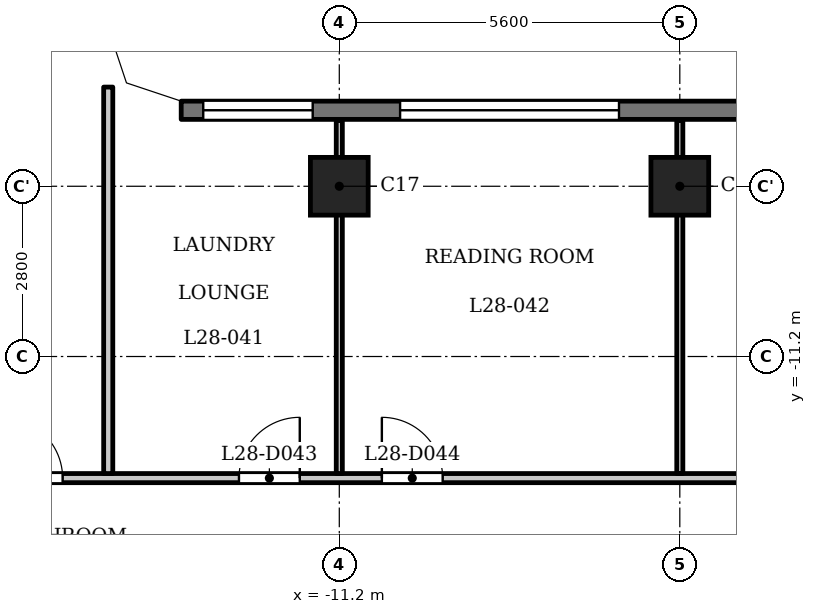
"""IFC4 building model, lengths in metres.
Left out: names, types, materials, properties, quantities, classifications, styles, units other than length and angle.
Written with IfcOpenShell. Run it as: python <this file> out.ifc"""

import sys

from ifc_helpers import new_model, si_unit, direction, frame, frame_2d, origin, origin_2d, place, context, subcontext, project, spatial, polyline, rectangle, outline, extrude, element, fill, save


model = new_model("IFC4")
c1 = context("Model", 3, precision=1e-05, world=origin(), true_north=direction((0.0, 1.0)))
c2 = subcontext(c1, "Body", "Model", "MODEL_VIEW")
j1 = project(units=[si_unit("LENGTHUNIT", "METRE"), si_unit("PLANEANGLEUNIT", "RADIAN")], contexts=[c1])
p1 = place(None, origin())
s1 = spatial("IfcSite", under=j1, at=p1, CompositionType="ELEMENT")
p2 = place(p1, origin())
s2 = spatial("IfcBuilding", under=s1, at=p2, CompositionType="ELEMENT")
p3 = place(p2, frame((0.0, 0.0, 111.3)))
s3 = spatial("IfcBuildingStorey", under=s2, at=p3, CompositionType="ELEMENT", Elevation=111.3)
for number, where, z_axis, x_axis in (
    (1, (-11.2, -8.4, 0.0), (0.0, 0.0, 1.0), (1.0, 0.0, 0.0)),
    (2, (-5.6, -8.4, 0.0), (0.0, 0.0, 1.0), (1.0, 0.0, 0.0)),
):
    element("IfcColumn", number, at=place(p3, frame(where, z_axis=z_axis, x_axis=x_axis)), inside=s3, PredefinedType="COLUMN", context=c2, shape_type="SweptSolid", body=[
        extrude(rectangle(XDim=0.95, YDim=0.95, at=origin_2d()), origin(), (0.0, 0.0, 1.0), 3.5),
    ])
p4 = place(p3, frame((13.8, -7.15, 0.0), z_axis=(0.0, 0.0, 1.0), x_axis=(-1.0, 0.0, 0.0)))
e3 = element("IfcWall", 3, at=p4, inside=s3, PredefinedType="SOLIDWALL", context=c2, shape_type="SweptSolid", body=[
    extrude(rectangle(XDim=27.6, YDim=0.3, at=frame_2d((13.8, 0.0))), origin(), (0.0, 0.0, 1.0), 3.2),
])
p5 = place(p4, frame((0.363, 0.0, 0.9)))
e4 = element("IfcOpeningElement", 4, at=p5, cuts=e3, PredefinedType="OPENING", context=c2, shape_type="SweptSolid", body=[
    extrude(rectangle(XDim=1.8, YDim=1.25, at=frame_2d((0.9, 0.625))), frame((0.0, 0.16, 0.0), z_axis=(0.0, -1.0, 0.0), x_axis=(1.0, 0.0, 0.0)), (0.0, 0.0, 1.0), 0.32),
])
p6 = place(p4, frame((3.6, 0.0, 1.2)))
e5 = element("IfcOpeningElement", 5, at=p6, cuts=e3, PredefinedType="OPENING", context=c2, shape_type="SweptSolid", body=[
    extrude(rectangle(XDim=3.6, YDim=0.95, at=frame_2d((1.8, 0.475))), frame((0.0, 0.16, 0.0), z_axis=(0.0, -1.0, 0.0), x_axis=(1.0, 0.0, 0.0)), (0.0, 0.0, 1.0), 0.32),
])
p7 = place(p4, frame((9.2, 0.0, 1.2)))
e6 = element("IfcOpeningElement", 6, at=p7, cuts=e3, PredefinedType="OPENING", context=c2, shape_type="SweptSolid", body=[
    extrude(rectangle(XDim=3.6, YDim=0.95, at=frame_2d((1.8, 0.475))), frame((0.0, 0.16, 0.0), z_axis=(0.0, -1.0, 0.0), x_axis=(1.0, 0.0, 0.0)), (0.0, 0.0, 1.0), 0.32),
])
p8 = place(p4, frame((14.8, 0.0, 1.2)))
e7 = element("IfcOpeningElement", 7, at=p8, cuts=e3, PredefinedType="OPENING", context=c2, shape_type="SweptSolid", body=[
    extrude(rectangle(XDim=3.6, YDim=0.95, at=frame_2d((1.8, 0.475))), frame((0.0, 0.16, 0.0), z_axis=(0.0, -1.0, 0.0), x_axis=(1.0, 0.0, 0.0)), (0.0, 0.0, 1.0), 0.32),
])
p9 = place(p4, frame((20.4, 0.0, 1.2)))
e8 = element("IfcOpeningElement", 8, at=p9, cuts=e3, PredefinedType="OPENING", context=c2, shape_type="SweptSolid", body=[
    extrude(rectangle(XDim=3.6, YDim=0.95, at=frame_2d((1.8, 0.475))), frame((0.0, 0.16, 0.0), z_axis=(0.0, -1.0, 0.0), x_axis=(1.0, 0.0, 0.0)), (0.0, 0.0, 1.0), 0.32),
])
p10 = place(p4, frame((25.438, 0.0, 0.9)))
e9 = element("IfcOpeningElement", 9, at=p10, cuts=e3, PredefinedType="OPENING", context=c2, shape_type="SweptSolid", body=[
    extrude(rectangle(XDim=1.8, YDim=1.25, at=frame_2d((0.9, 0.625))), frame((0.0, 0.16, 0.0), z_axis=(0.0, -1.0, 0.0), x_axis=(1.0, 0.0, 0.0)), (0.0, 0.0, 1.0), 0.32),
])
p11 = place(p3, frame((-17.4, -13.2, 0.0), z_axis=(0.0, 0.0, 1.0), x_axis=(1.0, 0.0, 0.0)))
e10 = element("IfcWall", 10, at=p11, inside=s3, PredefinedType="PARTITIONING", context=c2, shape_type="SweptSolid", body=[
    extrude(rectangle(XDim=34.8, YDim=0.15, at=frame_2d((17.4, 0.0))), origin(), (0.0, 0.0, 1.0), 3.2),
])
p12 = place(p11, frame((0.65, 0.0, 0.0)))
e11 = element("IfcOpeningElement", 11, at=p12, cuts=e10, PredefinedType="OPENING", context=c2, shape_type="SweptSolid", body=[
    extrude(rectangle(XDim=1.0, YDim=2.1, at=frame_2d((0.5, 1.05))), frame((0.0, 0.085, 0.0), z_axis=(0.0, -1.0, 0.0), x_axis=(1.0, 0.0, 0.0)), (0.0, 0.0, 1.0), 0.17),
])
p13 = place(p11, frame((33.05, 0.0, 0.0)))
e12 = element("IfcOpeningElement", 12, at=p13, cuts=e10, PredefinedType="OPENING", context=c2, shape_type="SweptSolid", body=[
    extrude(rectangle(XDim=1.0, YDim=2.1, at=frame_2d((0.5, 1.05))), frame((0.0, 0.085, 0.0), z_axis=(0.0, -1.0, 0.0), x_axis=(1.0, 0.0, 0.0)), (0.0, 0.0, 1.0), 0.17),
])
p14 = place(p11, frame((4.55, 0.0, 0.0)))
e13 = element("IfcOpeningElement", 13, at=p14, cuts=e10, PredefinedType="OPENING", context=c2, shape_type="SweptSolid", body=[
    extrude(rectangle(XDim=1.0, YDim=2.1, at=frame_2d((0.5, 1.05))), frame((0.0, 0.085, 0.0), z_axis=(0.0, -1.0, 0.0), x_axis=(1.0, 0.0, 0.0)), (0.0, 0.0, 1.0), 0.17),
])
p15 = place(p11, frame((6.9, 0.0, 0.0)))
e14 = element("IfcOpeningElement", 14, at=p15, cuts=e10, PredefinedType="OPENING", context=c2, shape_type="SweptSolid", body=[
    extrude(rectangle(XDim=1.0, YDim=2.1, at=frame_2d((0.5, 1.05))), frame((0.0, 0.085, 0.0), z_axis=(0.0, -1.0, 0.0), x_axis=(1.0, 0.0, 0.0)), (0.0, 0.0, 1.0), 0.17),
])
p16 = place(p11, frame((15.75, 0.0, 0.0)))
e15 = element("IfcOpeningElement", 15, at=p16, cuts=e10, PredefinedType="OPENING", context=c2, shape_type="SweptSolid", body=[
    extrude(rectangle(XDim=1.0, YDim=2.1, at=frame_2d((0.5, 1.05))), frame((0.0, 0.085, 0.0), z_axis=(0.0, -1.0, 0.0), x_axis=(1.0, 0.0, 0.0)), (0.0, 0.0, 1.0), 0.17),
])
p17 = place(p11, frame((18.1, 0.0, 0.0)))
e16 = element("IfcOpeningElement", 16, at=p17, cuts=e10, PredefinedType="OPENING", context=c2, shape_type="SweptSolid", body=[
    extrude(rectangle(XDim=1.0, YDim=2.1, at=frame_2d((0.5, 1.05))), frame((0.0, 0.085, 0.0), z_axis=(0.0, -1.0, 0.0), x_axis=(1.0, 0.0, 0.0)), (0.0, 0.0, 1.0), 0.17),
])
p18 = place(p11, frame((26.95, 0.0, 0.0)))
e17 = element("IfcOpeningElement", 17, at=p18, cuts=e10, PredefinedType="OPENING", context=c2, shape_type="SweptSolid", body=[
    extrude(rectangle(XDim=1.0, YDim=2.1, at=frame_2d((0.5, 1.05))), frame((0.0, 0.085, 0.0), z_axis=(0.0, -1.0, 0.0), x_axis=(1.0, 0.0, 0.0)), (0.0, 0.0, 1.0), 0.17),
])
p19 = place(p11, frame((29.25, 0.0, 0.0)))
e18 = element("IfcOpeningElement", 18, at=p19, cuts=e10, PredefinedType="OPENING", context=c2, shape_type="SweptSolid", body=[
    extrude(rectangle(XDim=1.0, YDim=2.1, at=frame_2d((0.5, 1.05))), frame((0.0, 0.085, 0.0), z_axis=(0.0, -1.0, 0.0), x_axis=(1.0, 0.0, 0.0)), (0.0, 0.0, 1.0), 0.17),
])
p20 = place(p3, frame((-15.0, -13.125, 0.0), z_axis=(0.0, 0.0, 1.0), x_axis=(0.0, 1.0, 0.0)))
e19 = element("IfcWall", 19, at=p20, inside=s3, PredefinedType="PARTITIONING", context=c2, shape_type="SweptSolid", body=[
    extrude(rectangle(XDim=6.356, YDim=0.15, at=frame_2d((3.178, 0.0))), origin(), (0.0, 0.0, 1.0), 3.2),
])
for number, where, z_axis, x_axis in (
    (20, (-11.2, -13.125, 0.0), (0.0, 0.0, 1.0), (0.0, 1.0, 0.0)),
    (21, (-5.6, -13.125, 0.0), (0.0, 0.0, 1.0), (0.0, 1.0, 0.0)),
):
    element("IfcWall", number, at=place(p3, frame(where, z_axis=z_axis, x_axis=x_axis)), inside=s3, PredefinedType="PARTITIONING", context=c2, shape_type="SweptSolid", body=[
        extrude(rectangle(XDim=5.805, YDim=0.1, at=frame_2d((2.902, 0.0))), origin(), (0.0, 0.0, 1.0), 3.2),
    ])
p21 = place(p3, origin())
e22 = element("IfcWall", 22, at=p21, inside=s3, PredefinedType="SOLIDWALL", context=c2, shape_type="SweptSolid", body=[
    extrude(outline(polyline([(-14.937, -6.937), (-13.849, -7.3), (-13.8, -7.3), (-13.8, -7.0), (-14.7, -6.7), (-15.0, -5.8), (-15.3, -5.8), (-15.3, -5.849), (-14.937, -6.937)])), origin(), (0.0, 0.0, 1.0), 3.2),
])
p22 = place(p12, origin())
e23 = element("IfcDoor", 23, at=p22, inside=s3, OperationType="SINGLE_SWING_RIGHT", PredefinedType="DOOR", context=c2, shape_type="SweptSolid", body=[
    extrude(rectangle(XDim=1.0, YDim=2.1, at=frame_2d((0.5, 1.05))), frame((0.0, 0.025, 0.0), z_axis=(0.0, -1.0, 0.0), x_axis=(1.0, 0.0, 0.0)), (0.0, 0.0, 1.0), 0.05),
])
fill(e11, e23)
p23 = place(p14, origin())
e24 = element("IfcDoor", 24, at=p23, inside=s3, OperationType="SINGLE_SWING_LEFT", PredefinedType="DOOR", context=c2, shape_type="SweptSolid", body=[
    extrude(rectangle(XDim=1.0, YDim=2.1, at=frame_2d((0.5, 1.05))), frame((0.0, 0.025, 0.0), z_axis=(0.0, -1.0, 0.0), x_axis=(1.0, 0.0, 0.0)), (0.0, 0.0, 1.0), 0.05),
])
fill(e13, e24)
p24 = place(p15, origin())
e25 = element("IfcDoor", 25, at=p24, inside=s3, OperationType="SINGLE_SWING_RIGHT", PredefinedType="DOOR", context=c2, shape_type="SweptSolid", body=[
    extrude(rectangle(XDim=1.0, YDim=2.1, at=frame_2d((0.5, 1.05))), frame((0.0, 0.025, 0.0), z_axis=(0.0, -1.0, 0.0), x_axis=(1.0, 0.0, 0.0)), (0.0, 0.0, 1.0), 0.05),
])
fill(e14, e25)
p25 = place(p9, origin())
e26 = element("IfcWindow", 26, at=p25, inside=s3, PartitioningType="SINGLE_PANEL", PredefinedType="WINDOW", context=c2, shape_type="SweptSolid", body=[
    extrude(rectangle(XDim=3.6, YDim=0.95, at=frame_2d((1.8, 0.475))), frame((0.0, 0.03, 0.0), z_axis=(0.0, -1.0, 0.0), x_axis=(1.0, 0.0, 0.0)), (0.0, 0.0, 1.0), 0.06),
])
fill(e8, e26)
p26 = place(p10, origin())
e27 = element("IfcWindow", 27, at=p26, inside=s3, PartitioningType="SINGLE_PANEL", PredefinedType="WINDOW", context=c2, shape_type="SweptSolid", body=[
    extrude(rectangle(XDim=1.8, YDim=1.25, at=frame_2d((0.9, 0.625))), frame((0.0, 0.03, 0.0), z_axis=(0.0, -1.0, 0.0), x_axis=(1.0, 0.0, 0.0)), (0.0, 0.0, 1.0), 0.06),
])
fill(e9, e27)
save(model, sys.argv[1])
